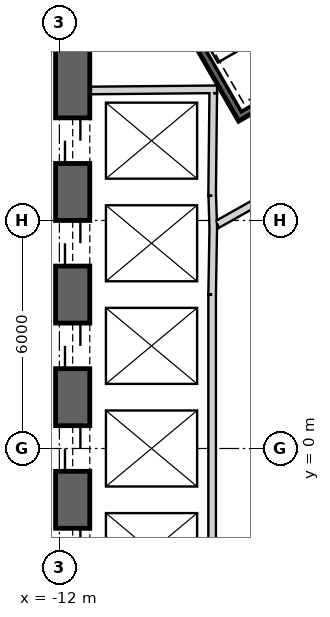
"""IFC4 building model, lengths in metres.
Left out: names, types, materials, properties, quantities, classifications, styles, units other than length and angle.
Written with IfcOpenShell. Run it as: python <this file> out.ifc"""

import sys

from ifc_helpers import new_model, si_unit, direction, frame, frame_2d, origin, place, context, subcontext, project, spatial, rectangle, extrude, element, fill, save


model = new_model("IFC4")
c1 = context("Model", 3, precision=1e-05, world=origin(), true_north=direction((0.0, 1.0)))
c2 = subcontext(c1, "Body", "Model", "MODEL_VIEW")
j1 = project(units=[si_unit("LENGTHUNIT", "METRE"), si_unit("PLANEANGLEUNIT", "RADIAN")], contexts=[c1])
p1 = place(None, origin())
s1 = spatial("IfcSite", under=j1, at=p1, CompositionType="ELEMENT")
p2 = place(p1, origin())
s2 = spatial("IfcBuilding", under=s1, at=p2, CompositionType="ELEMENT")
p3 = place(p2, frame((0.0, 0.0, 9.0)))
s3 = spatial("IfcBuildingStorey", under=s2, at=p3, CompositionType="ELEMENT", Elevation=9.0)
p4 = place(p3, frame((19.475, 2.208, 0.0), z_axis=(0.0, 0.0, 1.0), x_axis=(-0.866028369851, 0.499994862586, 0.0)))
e1 = element("IfcWall", 1, at=p4, inside=s3, PredefinedType="SHEAR", context=c2, shape_type="SweptSolid", body=[
    extrude(rectangle(XDim=31.523, YDim=0.9, at=frame_2d((15.762, 0.0))), origin(), (0.0, 0.0, 1.0), 6.5),
])
p5 = place(p4, frame((7.062, 0.0, 0.0)))
e2 = element("IfcOpeningElement", 2, at=p5, cuts=e1, PredefinedType="OPENING", context=c2, shape_type="SweptSolid", body=[
    extrude(rectangle(XDim=1.2, YDim=2.4, at=frame_2d((0.6, 1.2))), frame((0.0, 0.46, 0.0), z_axis=(0.0, -1.0, 0.0), x_axis=(1.0, 0.0, 0.0)), (0.0, 0.0, 1.0), 0.92),
])
p6 = place(p4, frame((9.762, 0.0, 0.0)))
e3 = element("IfcOpeningElement", 3, at=p6, cuts=e1, PredefinedType="OPENING", context=c2, shape_type="SweptSolid", body=[
    extrude(rectangle(XDim=1.2, YDim=2.4, at=frame_2d((0.6, 1.2))), frame((0.0, 0.46, 0.0), z_axis=(0.0, -1.0, 0.0), x_axis=(1.0, 0.0, 0.0)), (0.0, 0.0, 1.0), 0.92),
])
p7 = place(p4, frame((12.462, 0.0, 0.0)))
e4 = element("IfcOpeningElement", 4, at=p7, cuts=e1, PredefinedType="OPENING", context=c2, shape_type="SweptSolid", body=[
    extrude(rectangle(XDim=1.2, YDim=2.4, at=frame_2d((0.6, 1.2))), frame((0.0, 0.46, 0.0), z_axis=(0.0, -1.0, 0.0), x_axis=(1.0, 0.0, 0.0)), (0.0, 0.0, 1.0), 0.92),
])
p8 = place(p4, frame((15.162, 0.0, 0.0)))
e5 = element("IfcOpeningElement", 5, at=p8, cuts=e1, PredefinedType="OPENING", context=c2, shape_type="SweptSolid", body=[
    extrude(rectangle(XDim=1.2, YDim=2.4, at=frame_2d((0.6, 1.2))), frame((0.0, 0.46, 0.0), z_axis=(0.0, -1.0, 0.0), x_axis=(1.0, 0.0, 0.0)), (0.0, 0.0, 1.0), 0.92),
])
p9 = place(p4, frame((17.862, 0.0, 0.0)))
e6 = element("IfcOpeningElement", 6, at=p9, cuts=e1, PredefinedType="OPENING", context=c2, shape_type="SweptSolid", body=[
    extrude(rectangle(XDim=1.2, YDim=2.4, at=frame_2d((0.6, 1.2))), frame((0.0, 0.46, 0.0), z_axis=(0.0, -1.0, 0.0), x_axis=(1.0, 0.0, 0.0)), (0.0, 0.0, 1.0), 0.92),
])
p10 = place(p4, frame((20.562, 0.0, 0.0)))
e7 = element("IfcOpeningElement", 7, at=p10, cuts=e1, PredefinedType="OPENING", context=c2, shape_type="SweptSolid", body=[
    extrude(rectangle(XDim=1.2, YDim=2.4, at=frame_2d((0.6, 1.2))), frame((0.0, 0.46, 0.0), z_axis=(0.0, -1.0, 0.0), x_axis=(1.0, 0.0, 0.0)), (0.0, 0.0, 1.0), 0.92),
])
p11 = place(p4, frame((23.262, 0.0, 0.0)))
e8 = element("IfcOpeningElement", 8, at=p11, cuts=e1, PredefinedType="OPENING", context=c2, shape_type="SweptSolid", body=[
    extrude(rectangle(XDim=1.2, YDim=2.4, at=frame_2d((0.6, 1.2))), frame((0.0, 0.46, 0.0), z_axis=(0.0, -1.0, 0.0), x_axis=(1.0, 0.0, 0.0)), (0.0, 0.0, 1.0), 0.92),
])
p12 = place(p4, frame((3.612, 0.0, 0.0)))
e9 = element("IfcOpeningElement", 9, at=p12, cuts=e1, PredefinedType="OPENING", context=c2, shape_type="SweptSolid", body=[
    extrude(rectangle(XDim=1.2, YDim=2.4, at=frame_2d((0.6, 1.2))), frame((0.0, 0.46, 0.0), z_axis=(0.0, -1.0, 0.0), x_axis=(1.0, 0.0, 0.0)), (0.0, 0.0, 1.0), 0.92),
])
p13 = place(p4, frame((26.712, 0.0, 0.0)))
e10 = element("IfcOpeningElement", 10, at=p13, cuts=e1, PredefinedType="OPENING", context=c2, shape_type="SweptSolid", body=[
    extrude(rectangle(XDim=1.2, YDim=2.4, at=frame_2d((0.6, 1.2))), frame((0.0, 0.46, 0.0), z_axis=(0.0, -1.0, 0.0), x_axis=(1.0, 0.0, 0.0)), (0.0, 0.0, 1.0), 0.92),
])
p14 = place(p3, frame((-11.65, 15.762, 0.0), z_axis=(0.0, 0.0, 1.0), x_axis=(0.0, -1.0, 0.0)))
e11 = element("IfcWall", 11, at=p14, inside=s3, PredefinedType="SHEAR", context=c2, shape_type="SweptSolid", body=[
    extrude(rectangle(XDim=31.523, YDim=0.9, at=frame_2d((15.762, 0.0))), origin(), (0.0, 0.0, 1.0), 6.5),
])
p15 = place(p14, frame((7.062, 0.0, 0.0)))
e12 = element("IfcOpeningElement", 12, at=p15, cuts=e11, PredefinedType="OPENING", context=c2, shape_type="SweptSolid", body=[
    extrude(rectangle(XDim=1.2, YDim=2.4, at=frame_2d((0.6, 1.2))), frame((0.0, 0.46, 0.0), z_axis=(0.0, -1.0, 0.0), x_axis=(1.0, 0.0, 0.0)), (0.0, 0.0, 1.0), 0.92),
])
p16 = place(p14, frame((9.762, 0.0, 0.0)))
e13 = element("IfcOpeningElement", 13, at=p16, cuts=e11, PredefinedType="OPENING", context=c2, shape_type="SweptSolid", body=[
    extrude(rectangle(XDim=1.2, YDim=2.4, at=frame_2d((0.6, 1.2))), frame((0.0, 0.46, 0.0), z_axis=(0.0, -1.0, 0.0), x_axis=(1.0, 0.0, 0.0)), (0.0, 0.0, 1.0), 0.92),
])
p17 = place(p14, frame((12.462, 0.0, 0.0)))
e14 = element("IfcOpeningElement", 14, at=p17, cuts=e11, PredefinedType="OPENING", context=c2, shape_type="SweptSolid", body=[
    extrude(rectangle(XDim=1.2, YDim=2.4, at=frame_2d((0.6, 1.2))), frame((0.0, 0.46, 0.0), z_axis=(0.0, -1.0, 0.0), x_axis=(1.0, 0.0, 0.0)), (0.0, 0.0, 1.0), 0.92),
])
p18 = place(p14, frame((15.162, 0.0, 0.0)))
e15 = element("IfcOpeningElement", 15, at=p18, cuts=e11, PredefinedType="OPENING", context=c2, shape_type="SweptSolid", body=[
    extrude(rectangle(XDim=1.2, YDim=2.4, at=frame_2d((0.6, 1.2))), frame((0.0, 0.46, 0.0), z_axis=(0.0, -1.0, 0.0), x_axis=(1.0, 0.0, 0.0)), (0.0, 0.0, 1.0), 0.92),
])
p19 = place(p14, frame((17.862, 0.0, 0.0)))
e16 = element("IfcOpeningElement", 16, at=p19, cuts=e11, PredefinedType="OPENING", context=c2, shape_type="SweptSolid", body=[
    extrude(rectangle(XDim=1.2, YDim=2.4, at=frame_2d((0.6, 1.2))), frame((0.0, 0.46, 0.0), z_axis=(0.0, -1.0, 0.0), x_axis=(1.0, 0.0, 0.0)), (0.0, 0.0, 1.0), 0.92),
])
p20 = place(p14, frame((20.562, 0.0, 0.0)))
e17 = element("IfcOpeningElement", 17, at=p20, cuts=e11, PredefinedType="OPENING", context=c2, shape_type="SweptSolid", body=[
    extrude(rectangle(XDim=1.2, YDim=2.4, at=frame_2d((0.6, 1.2))), frame((0.0, 0.46, 0.0), z_axis=(0.0, -1.0, 0.0), x_axis=(1.0, 0.0, 0.0)), (0.0, 0.0, 1.0), 0.92),
])
p21 = place(p14, frame((23.262, 0.0, 0.0)))
e18 = element("IfcOpeningElement", 18, at=p21, cuts=e11, PredefinedType="OPENING", context=c2, shape_type="SweptSolid", body=[
    extrude(rectangle(XDim=1.2, YDim=2.4, at=frame_2d((0.6, 1.2))), frame((0.0, 0.46, 0.0), z_axis=(0.0, -1.0, 0.0), x_axis=(1.0, 0.0, 0.0)), (0.0, 0.0, 1.0), 0.92),
])
p22 = place(p14, frame((3.612, 0.0, 0.0)))
e19 = element("IfcOpeningElement", 19, at=p22, cuts=e11, PredefinedType="OPENING", context=c2, shape_type="SweptSolid", body=[
    extrude(rectangle(XDim=1.2, YDim=2.4, at=frame_2d((0.6, 1.2))), frame((0.0, 0.46, 0.0), z_axis=(0.0, -1.0, 0.0), x_axis=(1.0, 0.0, 0.0)), (0.0, 0.0, 1.0), 0.92),
])
p23 = place(p14, frame((26.712, 0.0, 0.0)))
e20 = element("IfcOpeningElement", 20, at=p23, cuts=e11, PredefinedType="OPENING", context=c2, shape_type="SweptSolid", body=[
    extrude(rectangle(XDim=1.2, YDim=2.4, at=frame_2d((0.6, 1.2))), frame((0.0, 0.46, 0.0), z_axis=(0.0, -1.0, 0.0), x_axis=(1.0, 0.0, 0.0)), (0.0, 0.0, 1.0), 0.92),
])
p24 = place(p3, frame((-7.825, -17.97, 0.0), z_axis=(0.0, 0.0, 1.0), x_axis=(0.866028369851, 0.499994862586, 0.0)))
e21 = element("IfcWall", 21, at=p24, inside=s3, PredefinedType="SHEAR", context=c2, shape_type="SweptSolid", body=[
    extrude(rectangle(XDim=31.523, YDim=0.9, at=frame_2d((15.762, 0.0))), origin(), (0.0, 0.0, 1.0), 6.5),
])
p25 = place(p24, frame((7.062, 0.0, 0.0)))
e22 = element("IfcOpeningElement", 22, at=p25, cuts=e21, PredefinedType="OPENING", context=c2, shape_type="SweptSolid", body=[
    extrude(rectangle(XDim=1.2, YDim=2.4, at=frame_2d((0.6, 1.2))), frame((0.0, 0.46, 0.0), z_axis=(0.0, -1.0, 0.0), x_axis=(1.0, 0.0, 0.0)), (0.0, 0.0, 1.0), 0.92),
])
p26 = place(p24, frame((9.762, 0.0, 0.0)))
e23 = element("IfcOpeningElement", 23, at=p26, cuts=e21, PredefinedType="OPENING", context=c2, shape_type="SweptSolid", body=[
    extrude(rectangle(XDim=1.2, YDim=2.4, at=frame_2d((0.6, 1.2))), frame((0.0, 0.46, 0.0), z_axis=(0.0, -1.0, 0.0), x_axis=(1.0, 0.0, 0.0)), (0.0, 0.0, 1.0), 0.92),
])
p27 = place(p24, frame((12.462, 0.0, 0.0)))
e24 = element("IfcOpeningElement", 24, at=p27, cuts=e21, PredefinedType="OPENING", context=c2, shape_type="SweptSolid", body=[
    extrude(rectangle(XDim=1.2, YDim=2.4, at=frame_2d((0.6, 1.2))), frame((0.0, 0.46, 0.0), z_axis=(0.0, -1.0, 0.0), x_axis=(1.0, 0.0, 0.0)), (0.0, 0.0, 1.0), 0.92),
])
p28 = place(p24, frame((15.162, 0.0, 0.0)))
e25 = element("IfcOpeningElement", 25, at=p28, cuts=e21, PredefinedType="OPENING", context=c2, shape_type="SweptSolid", body=[
    extrude(rectangle(XDim=1.2, YDim=2.4, at=frame_2d((0.6, 1.2))), frame((0.0, 0.46, 0.0), z_axis=(0.0, -1.0, 0.0), x_axis=(1.0, 0.0, 0.0)), (0.0, 0.0, 1.0), 0.92),
])
p29 = place(p24, frame((17.862, 0.0, 0.0)))
e26 = element("IfcOpeningElement", 26, at=p29, cuts=e21, PredefinedType="OPENING", context=c2, shape_type="SweptSolid", body=[
    extrude(rectangle(XDim=1.2, YDim=2.4, at=frame_2d((0.6, 1.2))), frame((0.0, 0.46, 0.0), z_axis=(0.0, -1.0, 0.0), x_axis=(1.0, 0.0, 0.0)), (0.0, 0.0, 1.0), 0.92),
])
p30 = place(p24, frame((20.562, 0.0, 0.0)))
e27 = element("IfcOpeningElement", 27, at=p30, cuts=e21, PredefinedType="OPENING", context=c2, shape_type="SweptSolid", body=[
    extrude(rectangle(XDim=1.2, YDim=2.4, at=frame_2d((0.6, 1.2))), frame((0.0, 0.46, 0.0), z_axis=(0.0, -1.0, 0.0), x_axis=(1.0, 0.0, 0.0)), (0.0, 0.0, 1.0), 0.92),
])
p31 = place(p24, frame((26.712, 0.0, 0.0)))
e28 = element("IfcOpeningElement", 28, at=p31, cuts=e21, PredefinedType="OPENING", context=c2, shape_type="SweptSolid", body=[
    extrude(rectangle(XDim=1.2, YDim=2.4, at=frame_2d((0.6, 1.2))), frame((0.0, 0.46, 0.0), z_axis=(0.0, -1.0, 0.0), x_axis=(1.0, 0.0, 0.0)), (0.0, 0.0, 1.0), 0.92),
])
p32 = place(p24, frame((3.612, 0.0, 0.0)))
e29 = element("IfcOpeningElement", 29, at=p32, cuts=e21, PredefinedType="OPENING", context=c2, shape_type="SweptSolid", body=[
    extrude(rectangle(XDim=1.2, YDim=2.4, at=frame_2d((0.6, 1.2))), frame((0.0, 0.46, 0.0), z_axis=(0.0, -1.0, 0.0), x_axis=(1.0, 0.0, 0.0)), (0.0, 0.0, 1.0), 0.92),
])
p33 = place(p3, frame((-11.2, 9.42, 0.0), z_axis=(0.0, 0.0, 1.0), x_axis=(0.999957167047, 0.009255488683, 0.0)))
e30 = element("IfcWall", 30, at=p33, inside=s3, PredefinedType="PLUMBINGWALL", context=c2, shape_type="SweptSolid", body=[
    extrude(rectangle(XDim=3.35, YDim=0.2, at=frame_2d((1.675, 0.0))), origin(), (0.0, 0.0, 1.0), 6.2),
])
p34 = place(p3, frame((-7.951, 9.35, 0.0), z_axis=(0.0, 0.0, 1.0), x_axis=(-0.011120469654, -0.999938165666, 0.0)))
e31 = element("IfcWall", 31, at=p34, inside=s3, PredefinedType="PLUMBINGWALL", context=c2, shape_type="SweptSolid", body=[
    extrude(rectangle(XDim=2.7, YDim=0.2, at=frame_2d((1.35, 0.0))), origin(), (0.0, 0.0, 1.0), 6.2),
])
p35 = place(p3, frame((-7.977, 6.65, 0.0), z_axis=(0.0, 0.0, 1.0), x_axis=(0.030861509705, -0.999523670164, 0.0)))
e32 = element("IfcWall", 32, at=p35, inside=s3, PredefinedType="PLUMBINGWALL", context=c2, shape_type="SweptSolid", body=[
    extrude(rectangle(XDim=0.878, YDim=0.2, at=frame_2d((0.439, 0.0))), origin(), (0.0, 0.0, 1.0), 6.2),
])
p36 = place(p3, frame((-7.949, 5.894, 0.0), z_axis=(0.0, 0.0, 1.0), x_axis=(-0.016809909365, -0.999858703491, 0.0)))
e33 = element("IfcWall", 33, at=p36, inside=s3, PredefinedType="PLUMBINGWALL", context=c2, shape_type="SweptSolid", body=[
    extrude(rectangle(XDim=1.844, YDim=0.2, at=frame_2d((0.922, 0.0))), origin(), (0.0, 0.0, 1.0), 6.2),
])
p37 = place(p3, frame((-7.98, 4.05, 0.0), z_axis=(0.0, 0.0, 1.0), x_axis=(0.0, -1.0, 0.0)))
e34 = element("IfcWall", 34, at=p37, inside=s3, PredefinedType="PLUMBINGWALL", context=c2, shape_type="SweptSolid", body=[
    extrude(rectangle(XDim=8.1, YDim=0.2, at=frame_2d((4.05, 0.0))), origin(), (0.0, 0.0, 1.0), 6.2),
])
p38 = place(p3, frame((-11.245, 15.678, -0.3), z_axis=(0.0, 0.0, 1.0), x_axis=(0.499977274689, -0.866038523851, 0.0)))
e35 = element("IfcWall", 35, at=p38, inside=s3, PredefinedType="SHEAR", context=c2, shape_type="SweptSolid", body=[
    extrude(rectangle(XDim=8.1, YDim=0.2, at=frame_2d((4.05, 0.0))), origin(), (0.0, 0.0, 1.0), 6.5),
])
p39 = place(p3, frame((-7.159, 8.8, -0.3), z_axis=(0.0, 0.0, 1.0), x_axis=(0.866047807691, 0.499961193289, 0.0)))
e36 = element("IfcWall", 36, at=p39, inside=s3, PredefinedType="SHEAR", context=c2, shape_type="SweptSolid", body=[
    extrude(rectangle(XDim=3.6, YDim=0.2, at=frame_2d((1.8, 0.0))), origin(), (0.0, 0.0, 1.0), 6.5),
])
p40 = place(p39, frame((1.25, 0.0, 0.3)))
e37 = element("IfcOpeningElement", 37, at=p40, cuts=e36, PredefinedType="OPENING", context=c2, shape_type="SweptSolid", body=[
    extrude(rectangle(XDim=1.1, YDim=2.1, at=frame_2d((0.55, 1.05))), frame((0.0, 0.11, 0.0), z_axis=(0.0, -1.0, 0.0), x_axis=(1.0, 0.0, 0.0)), (0.0, 0.0, 1.0), 0.22),
])
p41 = place(p3, frame((-5.6, 7.16, 0.0), z_axis=(0.0, 0.0, 1.0), x_axis=(-0.871340486379, -0.490678873396, 0.0)))
e38 = element("IfcWall", 38, at=p41, inside=s3, PredefinedType="PARTITIONING", context=c2, shape_type="SweptSolid", body=[
    extrude(rectangle(XDim=2.581, YDim=0.2, at=frame_2d((1.291, 0.0))), origin(), (0.0, 0.0, 1.0), 6.2),
])
p42 = place(p15, origin())
e39 = element("IfcDoor", 39, at=p42, inside=s3, OperationType="SLIDING_TO_LEFT", PredefinedType="USERDEFINED", context=c2, shape_type="SweptSolid", body=[
    extrude(rectangle(XDim=1.2, YDim=2.4, at=frame_2d((0.6, 1.2))), frame((0.0, 0.025, 0.0), z_axis=(0.0, -1.0, 0.0), x_axis=(1.0, 0.0, 0.0)), (0.0, 0.0, 1.0), 0.05),
])
fill(e12, e39)
p43 = place(p16, origin())
e40 = element("IfcDoor", 40, at=p43, inside=s3, OperationType="SLIDING_TO_LEFT", PredefinedType="USERDEFINED", context=c2, shape_type="SweptSolid", body=[
    extrude(rectangle(XDim=1.2, YDim=2.4, at=frame_2d((0.6, 1.2))), frame((0.0, 0.025, 0.0), z_axis=(0.0, -1.0, 0.0), x_axis=(1.0, 0.0, 0.0)), (0.0, 0.0, 1.0), 0.05),
])
fill(e13, e40)
p44 = place(p17, origin())
e41 = element("IfcDoor", 41, at=p44, inside=s3, OperationType="SLIDING_TO_LEFT", PredefinedType="USERDEFINED", context=c2, shape_type="SweptSolid", body=[
    extrude(rectangle(XDim=1.2, YDim=2.4, at=frame_2d((0.6, 1.2))), frame((0.0, 0.025, 0.0), z_axis=(0.0, -1.0, 0.0), x_axis=(1.0, 0.0, 0.0)), (0.0, 0.0, 1.0), 0.05),
])
fill(e14, e41)
p45 = place(p18, origin())
e42 = element("IfcDoor", 42, at=p45, inside=s3, OperationType="SLIDING_TO_LEFT", PredefinedType="USERDEFINED", context=c2, shape_type="SweptSolid", body=[
    extrude(rectangle(XDim=1.2, YDim=2.4, at=frame_2d((0.6, 1.2))), frame((0.0, 0.025, 0.0), z_axis=(0.0, -1.0, 0.0), x_axis=(1.0, 0.0, 0.0)), (0.0, 0.0, 1.0), 0.05),
])
fill(e15, e42)
p46 = place(p19, origin())
e43 = element("IfcDoor", 43, at=p46, inside=s3, OperationType="SLIDING_TO_LEFT", PredefinedType="USERDEFINED", context=c2, shape_type="SweptSolid", body=[
    extrude(rectangle(XDim=1.2, YDim=2.4, at=frame_2d((0.6, 1.2))), frame((0.0, 0.025, 0.0), z_axis=(0.0, -1.0, 0.0), x_axis=(1.0, 0.0, 0.0)), (0.0, 0.0, 1.0), 0.05),
])
fill(e16, e43)
save(model, sys.argv[1])
